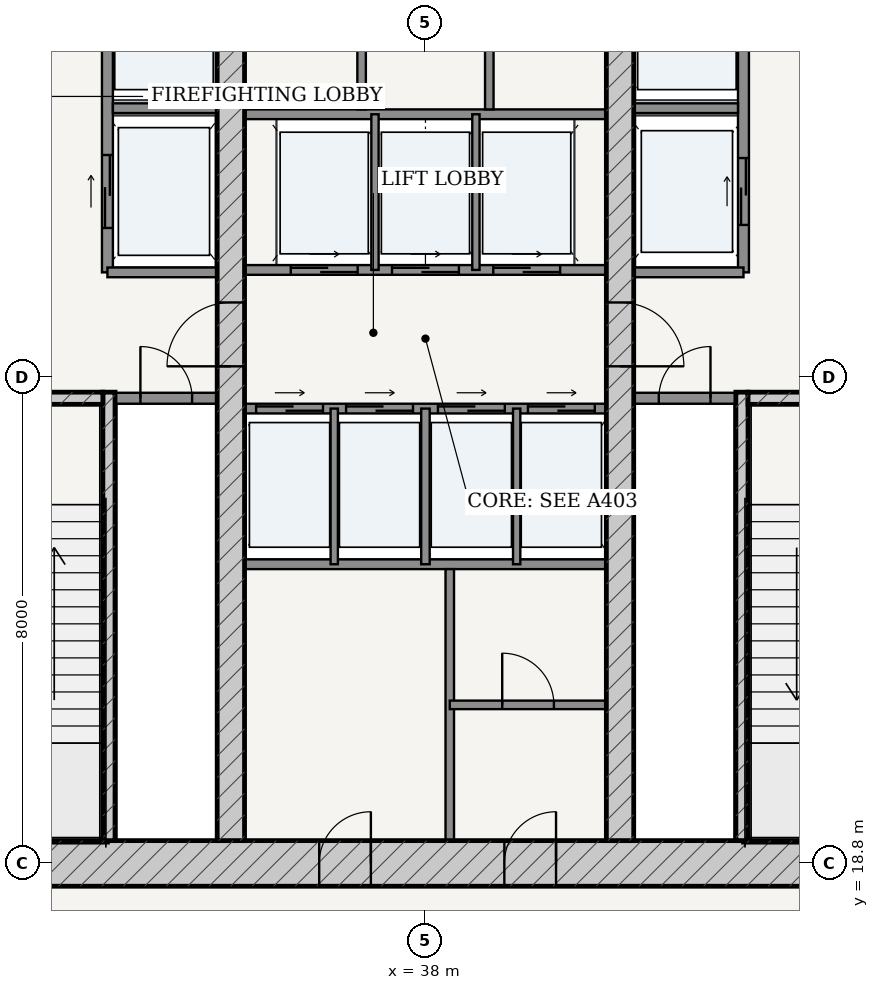
"""IFC4 building model, lengths in metres.
Left out: names, types, materials, properties, quantities, classifications, styles, units other than length and angle.
Written with IfcOpenShell. Run it as: python <this file> out.ifc"""

import sys

from ifc_helpers import new_model, si_unit, direction, frame, frame_2d, origin, place, context, subcontext, project, spatial, rectangle, extrude, source, transform, mapped, element, fill, save


model = new_model("IFC4")
c1 = context("Model", 3, precision=1e-05, world=origin(), true_north=direction((-0.2419218956, 0.970295726276)))
c2 = subcontext(c1, "Body", "Model", "MODEL_VIEW")
j1 = project(units=[si_unit("LENGTHUNIT", "METRE"), si_unit("PLANEANGLEUNIT", "RADIAN")], contexts=[c1])
p1 = place(None, origin())
s1 = spatial("IfcSite", under=j1, at=p1, CompositionType="ELEMENT")
p2 = place(p1, origin())
s2 = spatial("IfcBuilding", under=s1, at=p2, CompositionType="ELEMENT")
p3 = place(p2, origin())
s3 = spatial("IfcBuildingStorey", under=s2, at=p3, CompositionType="ELEMENT", Elevation=0.0)
p4 = place(p3, frame((28.625, 18.8, 0.0), z_axis=(0.0, 0.0, 1.0), x_axis=(1.0, 0.0, 0.0)))
e1 = element("IfcWall", 1, at=p4, inside=s3, PredefinedType="SHEAR", context=c2, shape_type="SweptSolid", body=[
    extrude(rectangle(XDim=18.75, YDim=0.75, at=frame_2d((9.375, 0.0))), origin(), (0.0, 0.0, 1.0), 5.1),
])
p5 = place(p4, frame((7.627, 0.0, 0.0)))
e2 = element("IfcOpeningElement", 2, at=p5, cuts=e1, PredefinedType="OPENING", context=c2, shape_type="SweptSolid", body=[
    extrude(rectangle(XDim=0.85, YDim=2.1, at=frame_2d((0.425, 1.05))), frame((0.0, 0.385, 0.0), z_axis=(0.0, -1.0, 0.0), x_axis=(1.0, 0.0, 0.0)), (0.0, 0.0, 1.0), 0.77),
])
p6 = place(p4, frame((10.673, 0.0, 0.0)))
e3 = element("IfcOpeningElement", 3, at=p6, cuts=e1, PredefinedType="OPENING", context=c2, shape_type="SweptSolid", body=[
    extrude(rectangle(XDim=0.85, YDim=2.1, at=frame_2d((0.425, 1.05))), frame((0.0, 0.385, 0.0), z_axis=(0.0, -1.0, 0.0), x_axis=(1.0, 0.0, 0.0)), (0.0, 0.0, 1.0), 0.77),
])
p7 = place(p3, frame((32.795, 19.175, 0.0), z_axis=(0.0, 0.0, 1.0), x_axis=(0.0, 1.0, 0.0)))
e4 = element("IfcWall", 4, at=p7, inside=s3, PredefinedType="SOLIDWALL", context=c2, shape_type="SweptSolid", body=[
    extrude(rectangle(XDim=7.375, YDim=0.2, at=frame_2d((3.688, 0.0))), origin(), (0.0, 0.0, 1.0), 5.1),
])
p8 = place(p3, frame((29.375, 26.45, 0.0), z_axis=(0.0, 0.0, 1.0), x_axis=(1.0, 0.0, 0.0)))
e5 = element("IfcWall", 5, at=p8, inside=s3, PredefinedType="SOLIDWALL", context=c2, shape_type="SweptSolid", body=[
    extrude(rectangle(XDim=3.32, YDim=0.2, at=frame_2d((1.66, 0.0))), origin(), (0.0, 0.0, 1.0), 5.1),
])
p9 = place(p8, frame((1.185, 0.0, 0.0)))
e6 = element("IfcOpeningElement", 6, at=p9, cuts=e5, PredefinedType="OPENING", context=c2, shape_type="SweptSolid", body=[
    extrude(rectangle(XDim=0.95, YDim=2.15, at=frame_2d((0.475, 1.075))), frame((0.0, 0.11, 0.0), z_axis=(0.0, -1.0, 0.0), x_axis=(1.0, 0.0, 0.0)), (0.0, 0.0, 1.0), 0.22),
])
p10 = place(p3, frame((43.205, 19.175, 0.0), z_axis=(0.0, 0.0, 1.0), x_axis=(0.0, 1.0, 0.0)))
e7 = element("IfcWall", 7, at=p10, inside=s3, PredefinedType="SOLIDWALL", context=c2, shape_type="SweptSolid", body=[
    extrude(rectangle(XDim=7.375, YDim=0.2, at=frame_2d((3.688, 0.0))), origin(), (0.0, 0.0, 1.0), 5.1),
])
p11 = place(p3, frame((43.305, 26.45, 0.0), z_axis=(0.0, 0.0, 1.0), x_axis=(1.0, 0.0, 0.0)))
e8 = element("IfcWall", 8, at=p11, inside=s3, PredefinedType="SOLIDWALL", context=c2, shape_type="SweptSolid", body=[
    extrude(rectangle(XDim=3.32, YDim=0.2, at=frame_2d((1.66, 0.0))), origin(), (0.0, 0.0, 1.0), 5.1),
])
p12 = place(p11, frame((1.185, 0.0, 0.0)))
e9 = element("IfcOpeningElement", 9, at=p12, cuts=e8, PredefinedType="OPENING", context=c2, shape_type="SweptSolid", body=[
    extrude(rectangle(XDim=0.95, YDim=2.15, at=frame_2d((0.475, 1.075))), frame((0.0, 0.11, 0.0), z_axis=(0.0, -1.0, 0.0), x_axis=(1.0, 0.0, 0.0)), (0.0, 0.0, 1.0), 0.22),
])
p13 = place(p3, frame((34.8, 19.175, 0.0), z_axis=(0.0, 0.0, 1.0), x_axis=(0.0, 1.0, 0.0)))
e10 = element("IfcWall", 10, at=p13, inside=s3, PredefinedType="SHEAR", context=c2, shape_type="SweptSolid", body=[
    extrude(rectangle(XDim=15.25, YDim=0.45, at=frame_2d((7.625, 0.0))), origin(), (0.0, 0.0, 1.0), 5.1),
])
p14 = place(p13, frame((7.8, 0.0, 0.0)))
e11 = element("IfcOpeningElement", 11, at=p14, cuts=e10, PredefinedType="OPENING", context=c2, shape_type="SweptSolid", body=[
    extrude(rectangle(XDim=1.05, YDim=2.15, at=frame_2d((0.525, 1.075))), frame((0.0, 0.235, 0.0), z_axis=(0.0, -1.0, 0.0), x_axis=(1.0, 0.0, 0.0)), (0.0, 0.0, 1.0), 0.47),
])
p15 = place(p3, frame((41.2, 19.175, 0.0), z_axis=(0.0, 0.0, 1.0), x_axis=(0.0, 1.0, 0.0)))
e12 = element("IfcWall", 12, at=p15, inside=s3, PredefinedType="SHEAR", context=c2, shape_type="SweptSolid", body=[
    extrude(rectangle(XDim=15.25, YDim=0.45, at=frame_2d((7.625, 0.0))), origin(), (0.0, 0.0, 1.0), 5.1),
])
p16 = place(p15, frame((7.8, 0.0, 0.0)))
e13 = element("IfcOpeningElement", 13, at=p16, cuts=e12, PredefinedType="OPENING", context=c2, shape_type="SweptSolid", body=[
    extrude(rectangle(XDim=1.05, YDim=2.15, at=frame_2d((0.525, 1.075))), frame((0.0, 0.235, 0.0), z_axis=(0.0, -1.0, 0.0), x_axis=(1.0, 0.0, 0.0)), (0.0, 0.0, 1.0), 0.47),
])
p17 = place(p3, frame((32.9, 26.45, 0.0), z_axis=(0.0, 0.0, 1.0), x_axis=(1.0, 0.0, 0.0)))
e14 = element("IfcWall", 14, at=p17, inside=s3, PredefinedType="PARTITIONING", context=c2, shape_type="SweptSolid", body=[
    extrude(rectangle(XDim=1.675, YDim=0.18, at=frame_2d((0.837, 0.0))), origin(), (0.0, 0.0, 1.0), 5.1),
])
p18 = place(p17, frame((0.413, 0.0, 0.0)))
e15 = element("IfcOpeningElement", 15, at=p18, cuts=e14, PredefinedType="OPENING", context=c2, shape_type="SweptSolid", body=[
    extrude(rectangle(XDim=0.85, YDim=2.1, at=frame_2d((0.425, 1.05))), frame((0.0, 0.1, 0.0), z_axis=(0.0, -1.0, 0.0), x_axis=(1.0, 0.0, 0.0)), (0.0, 0.0, 1.0), 0.2),
])
p19 = place(p3, frame((41.425, 26.45, 0.0), z_axis=(0.0, 0.0, 1.0), x_axis=(1.0, 0.0, 0.0)))
e16 = element("IfcWall", 16, at=p19, inside=s3, PredefinedType="PARTITIONING", context=c2, shape_type="SweptSolid", body=[
    extrude(rectangle(XDim=1.675, YDim=0.18, at=frame_2d((0.837, 0.0))), origin(), (0.0, 0.0, 1.0), 5.1),
])
p20 = place(p19, frame((0.413, 0.0, 0.0)))
e17 = element("IfcOpeningElement", 17, at=p20, cuts=e16, PredefinedType="OPENING", context=c2, shape_type="SweptSolid", body=[
    extrude(rectangle(XDim=0.85, YDim=2.1, at=frame_2d((0.425, 1.05))), frame((0.0, 0.1, 0.0), z_axis=(0.0, -1.0, 0.0), x_axis=(1.0, 0.0, 0.0)), (0.0, 0.0, 1.0), 0.2),
])
p21 = place(p3, frame((32.77, 28.52, 0.0), z_axis=(0.0, 0.0, 1.0), x_axis=(0.0, 1.0, 0.0)))
e18 = element("IfcWall", 18, at=p21, inside=s3, PredefinedType="PARTITIONING", context=c2, shape_type="SweptSolid", body=[
    extrude(rectangle(XDim=5.905, YDim=0.18, at=frame_2d((2.953, 0.0))), origin(), (0.0, 0.0, 1.0), 5.1),
])
p22 = place(p21, frame((3.655, 0.0, 0.0)))
e19 = element("IfcOpeningElement", 19, at=p22, cuts=e18, PredefinedType="OPENING", context=c2, shape_type="SweptSolid", body=[
    extrude(rectangle(XDim=1.15, YDim=2.2, at=frame_2d((0.575, 1.1))), frame((0.0, 0.1, 0.0), z_axis=(0.0, -1.0, 0.0), x_axis=(1.0, 0.0, 0.0)), (0.0, 0.0, 1.0), 0.2),
])
p23 = place(p21, frame((0.73, 0.0, 0.0)))
e20 = element("IfcOpeningElement", 20, at=p23, cuts=e18, PredefinedType="OPENING", context=c2, shape_type="SweptSolid", body=[
    extrude(rectangle(XDim=1.2, YDim=2.25, at=frame_2d((0.6, 1.125))), frame((0.0, 0.1, 0.0), z_axis=(0.0, -1.0, 0.0), x_axis=(1.0, 0.0, 0.0)), (0.0, 0.0, 1.0), 0.2),
])
p24 = place(p3, frame((32.86, 31.22, 0.0), z_axis=(0.0, 0.0, 1.0), x_axis=(1.0, 0.0, 0.0)))
e21 = element("IfcWall", 21, at=p24, inside=s3, PredefinedType="PARTITIONING", context=c2, shape_type="SweptSolid", body=[
    extrude(rectangle(XDim=1.715, YDim=0.16, at=frame_2d((0.857, 0.0))), origin(), (0.0, 0.0, 1.0), 5.1),
])
p25 = place(p3, frame((32.77, 28.52, 0.0), z_axis=(0.0, 0.0, 1.0), x_axis=(1.0, 0.0, 0.0)))
e22 = element("IfcWall", 22, at=p25, inside=s3, PredefinedType="PARTITIONING", context=c2, shape_type="SweptSolid", body=[
    extrude(rectangle(XDim=1.805, YDim=0.16, at=frame_2d((0.902, 0.0))), origin(), (0.0, 0.0, 1.0), 5.1),
])
p26 = place(p3, frame((43.23, 28.52, 0.0), z_axis=(0.0, 0.0, 1.0), x_axis=(0.0, 1.0, 0.0)))
e23 = element("IfcWall", 23, at=p26, inside=s3, PredefinedType="PARTITIONING", context=c2, shape_type="SweptSolid", body=[
    extrude(rectangle(XDim=5.905, YDim=0.18, at=frame_2d((2.953, 0.0))), origin(), (0.0, 0.0, 1.0), 5.1),
])
p27 = place(p26, frame((3.655, 0.0, 0.0)))
e24 = element("IfcOpeningElement", 24, at=p27, cuts=e23, PredefinedType="OPENING", context=c2, shape_type="SweptSolid", body=[
    extrude(rectangle(XDim=1.15, YDim=2.2, at=frame_2d((0.575, 1.1))), frame((0.0, 0.1, 0.0), z_axis=(0.0, -1.0, 0.0), x_axis=(1.0, 0.0, 0.0)), (0.0, 0.0, 1.0), 0.2),
])
p28 = place(p26, frame((0.78, 0.0, 0.0)))
e25 = element("IfcOpeningElement", 25, at=p28, cuts=e23, PredefinedType="OPENING", context=c2, shape_type="SweptSolid", body=[
    extrude(rectangle(XDim=1.1, YDim=2.2, at=frame_2d((0.55, 1.1))), frame((0.0, 0.1, 0.0), z_axis=(0.0, -1.0, 0.0), x_axis=(1.0, 0.0, 0.0)), (0.0, 0.0, 1.0), 0.2),
])
p29 = place(p3, frame((41.425, 31.22, 0.0), z_axis=(0.0, 0.0, 1.0), x_axis=(1.0, 0.0, 0.0)))
e26 = element("IfcWall", 26, at=p29, inside=s3, PredefinedType="PARTITIONING", context=c2, shape_type="SweptSolid", body=[
    extrude(rectangle(XDim=1.715, YDim=0.16, at=frame_2d((0.857, 0.0))), origin(), (0.0, 0.0, 1.0), 5.1),
])
p30 = place(p3, frame((41.425, 28.52, 0.0), z_axis=(0.0, 0.0, 1.0), x_axis=(1.0, 0.0, 0.0)))
e27 = element("IfcWall", 27, at=p30, inside=s3, PredefinedType="PARTITIONING", context=c2, shape_type="SweptSolid", body=[
    extrude(rectangle(XDim=1.805, YDim=0.16, at=frame_2d((0.902, 0.0))), origin(), (0.0, 0.0, 1.0), 5.1),
])
p31 = place(p3, frame((35.025, 28.56, 0.0), z_axis=(0.0, 0.0, 1.0), x_axis=(1.0, 0.0, 0.0)))
e28 = element("IfcWall", 28, at=p31, inside=s3, PredefinedType="PARTITIONING", context=c2, shape_type="SweptSolid", body=[
    extrude(rectangle(XDim=5.95, YDim=0.16, at=frame_2d((2.975, 0.0))), origin(), (0.0, 0.0, 1.0), 5.1),
])
p32 = place(p31, frame((0.76, 0.0, 0.0)))
e29 = element("IfcOpeningElement", 29, at=p32, cuts=e28, PredefinedType="OPENING", context=c2, shape_type="SweptSolid", body=[
    extrude(rectangle(XDim=1.1, YDim=2.2, at=frame_2d((0.55, 1.1))), frame((0.0, 0.09, 0.0), z_axis=(0.0, -1.0, 0.0), x_axis=(1.0, 0.0, 0.0)), (0.0, 0.0, 1.0), 0.18),
])
p33 = place(p31, frame((2.425, 0.0, 0.0)))
e30 = element("IfcOpeningElement", 30, at=p33, cuts=e28, PredefinedType="OPENING", context=c2, shape_type="SweptSolid", body=[
    extrude(rectangle(XDim=1.1, YDim=2.2, at=frame_2d((0.55, 1.1))), frame((0.0, 0.09, 0.0), z_axis=(0.0, -1.0, 0.0), x_axis=(1.0, 0.0, 0.0)), (0.0, 0.0, 1.0), 0.18),
])
p34 = place(p31, frame((4.09, 0.0, 0.0)))
e31 = element("IfcOpeningElement", 31, at=p34, cuts=e28, PredefinedType="OPENING", context=c2, shape_type="SweptSolid", body=[
    extrude(rectangle(XDim=1.1, YDim=2.2, at=frame_2d((0.55, 1.1))), frame((0.0, 0.09, 0.0), z_axis=(0.0, -1.0, 0.0), x_axis=(1.0, 0.0, 0.0)), (0.0, 0.0, 1.0), 0.18),
])
p35 = place(p3, frame((35.025, 31.12, 0.0), z_axis=(0.0, 0.0, 1.0), x_axis=(1.0, 0.0, 0.0)))
e32 = element("IfcWall", 32, at=p35, inside=s3, PredefinedType="PARTITIONING", context=c2, shape_type="SweptSolid", body=[
    extrude(rectangle(XDim=5.95, YDim=0.16, at=frame_2d((2.975, 0.0))), origin(), (0.0, 0.0, 1.0), 5.1),
])
for number, where, z_axis, x_axis in (
    (33, (37.17, 28.56, 0.0), (0.0, 0.0, 1.0), (0.0, 1.0, 0.0)),
    (34, (38.83, 28.56, 0.0), (0.0, 0.0, 1.0), (0.0, 1.0, 0.0)),
):
    element("IfcWall", number, at=place(p3, frame(where, z_axis=z_axis, x_axis=x_axis)), inside=s3, PredefinedType="PARTITIONING", context=c2, shape_type="SweptSolid", body=[
        extrude(rectangle(XDim=2.56, YDim=0.12, at=frame_2d((1.28, 0.0))), origin(), (0.0, 0.0, 1.0), 5.1),
    ])
for number, where, z_axis, x_axis in (
    (35, (36.95, 31.2, 0.0), (0.0, 0.0, 1.0), (0.0, 1.0, 0.0)),
    (36, (39.05, 31.2, 0.0), (0.0, 0.0, 1.0), (0.0, 1.0, 0.0)),
):
    element("IfcWall", number, at=place(p3, frame(where, z_axis=z_axis, x_axis=x_axis)), inside=s3, PredefinedType="PARTITIONING", context=c2, shape_type="SweptSolid", body=[
        extrude(rectangle(XDim=3.225, YDim=0.14, at=frame_2d((1.613, 0.0))), origin(), (0.0, 0.0, 1.0), 5.1),
    ])
p36 = place(p3, frame((35.025, 26.28, 0.0), z_axis=(0.0, 0.0, 1.0), x_axis=(1.0, 0.0, 0.0)))
e37 = element("IfcWall", 37, at=p36, inside=s3, PredefinedType="PARTITIONING", context=c2, shape_type="SweptSolid", body=[
    extrude(rectangle(XDim=5.95, YDim=0.16, at=frame_2d((2.975, 0.0))), origin(), (0.0, 0.0, 1.0), 5.1),
])
p37 = place(p36, frame((0.19, 0.0, 0.0)))
e38 = element("IfcOpeningElement", 38, at=p37, cuts=e37, PredefinedType="OPENING", context=c2, shape_type="SweptSolid", body=[
    extrude(rectangle(XDim=1.1, YDim=2.2, at=frame_2d((0.55, 1.1))), frame((0.0, 0.09, 0.0), z_axis=(0.0, -1.0, 0.0), x_axis=(1.0, 0.0, 0.0)), (0.0, 0.0, 1.0), 0.18),
])
p38 = place(p36, frame((1.67, 0.0, 0.0)))
e39 = element("IfcOpeningElement", 39, at=p38, cuts=e37, PredefinedType="OPENING", context=c2, shape_type="SweptSolid", body=[
    extrude(rectangle(XDim=1.1, YDim=2.2, at=frame_2d((0.55, 1.1))), frame((0.0, 0.09, 0.0), z_axis=(0.0, -1.0, 0.0), x_axis=(1.0, 0.0, 0.0)), (0.0, 0.0, 1.0), 0.18),
])
p39 = place(p36, frame((3.18, 0.0, 0.0)))
e40 = element("IfcOpeningElement", 40, at=p39, cuts=e37, PredefinedType="OPENING", context=c2, shape_type="SweptSolid", body=[
    extrude(rectangle(XDim=1.1, YDim=2.2, at=frame_2d((0.55, 1.1))), frame((0.0, 0.09, 0.0), z_axis=(0.0, -1.0, 0.0), x_axis=(1.0, 0.0, 0.0)), (0.0, 0.0, 1.0), 0.18),
])
p40 = place(p36, frame((4.66, 0.0, 0.0)))
e41 = element("IfcOpeningElement", 41, at=p40, cuts=e37, PredefinedType="OPENING", context=c2, shape_type="SweptSolid", body=[
    extrude(rectangle(XDim=1.1, YDim=2.2, at=frame_2d((0.55, 1.1))), frame((0.0, 0.09, 0.0), z_axis=(0.0, -1.0, 0.0), x_axis=(1.0, 0.0, 0.0)), (0.0, 0.0, 1.0), 0.18),
])
p41 = place(p3, frame((35.025, 23.72, 0.0), z_axis=(0.0, 0.0, 1.0), x_axis=(1.0, 0.0, 0.0)))
e42 = element("IfcWall", 42, at=p41, inside=s3, PredefinedType="PARTITIONING", context=c2, shape_type="SweptSolid", body=[
    extrude(rectangle(XDim=5.95, YDim=0.16, at=frame_2d((2.975, 0.0))), origin(), (0.0, 0.0, 1.0), 5.1),
])
p42 = place(p3, frame((36.5, 23.72, 0.0), z_axis=(0.0, 0.0, 1.0), x_axis=(0.0, 1.0, 0.0)))
e43 = element("IfcWall", 43, at=p42, inside=s3, PredefinedType="PARTITIONING", context=c2, shape_type="SweptSolid", body=[
    extrude(rectangle(XDim=2.56, YDim=0.12, at=frame_2d((1.28, 0.0))), origin(), (0.0, 0.0, 1.0), 5.1),
])
p43 = place(p3, frame((38.0, 23.72, 0.0), z_axis=(0.0, 0.0, 1.0), x_axis=(0.0, 1.0, 0.0)))
e44 = element("IfcWall", 44, at=p43, inside=s3, PredefinedType="PARTITIONING", context=c2, shape_type="SweptSolid", body=[
    extrude(rectangle(XDim=2.56, YDim=0.14, at=frame_2d((1.28, 0.0))), origin(), (0.0, 0.0, 1.0), 5.1),
])
p44 = place(p3, frame((39.5, 23.72, 0.0), z_axis=(0.0, 0.0, 1.0), x_axis=(0.0, 1.0, 0.0)))
e45 = element("IfcWall", 45, at=p44, inside=s3, PredefinedType="PARTITIONING", context=c2, shape_type="SweptSolid", body=[
    extrude(rectangle(XDim=2.56, YDim=0.12, at=frame_2d((1.28, 0.0))), origin(), (0.0, 0.0, 1.0), 5.1),
])
p45 = place(p3, frame((38.4, 19.175, 0.0), z_axis=(0.0, 0.0, 1.0), x_axis=(0.0, 1.0, 0.0)))
e46 = element("IfcWall", 46, at=p45, inside=s3, PredefinedType="PARTITIONING", context=c2, shape_type="SweptSolid", body=[
    extrude(rectangle(XDim=4.465, YDim=0.14, at=frame_2d((2.232, 0.0))), origin(), (0.0, 0.0, 1.0), 5.1),
])
p46 = place(p3, frame((38.4, 21.407, 0.0), z_axis=(0.0, 0.0, 1.0), x_axis=(1.0, 0.0, 0.0)))
e47 = element("IfcWall", 47, at=p46, inside=s3, PredefinedType="PARTITIONING", context=c2, shape_type="SweptSolid", body=[
    extrude(rectangle(XDim=2.575, YDim=0.14, at=frame_2d((1.288, 0.0))), origin(), (0.0, 0.0, 1.0), 5.1),
])
p47 = place(p46, frame((0.863, 0.0, 0.0)))
e48 = element("IfcOpeningElement", 48, at=p47, cuts=e47, PredefinedType="OPENING", context=c2, shape_type="SweptSolid", body=[
    extrude(rectangle(XDim=0.85, YDim=2.1, at=frame_2d((0.425, 1.05))), frame((0.0, 0.08, 0.0), z_axis=(0.0, -1.0, 0.0), x_axis=(1.0, 0.0, 0.0)), (0.0, 0.0, 1.0), 0.16),
])
m1 = source(origin(), c2, "Body", "SweptSolid", [
    extrude(rectangle(XDim=1.05, YDim=2.15, at=frame_2d((0.525, 1.075))), frame((0.0, 0.025, 0.0), z_axis=(0.0, -1.0, 0.0), x_axis=(1.0, 0.0, 0.0)), (0.0, 0.0, 1.0), 0.05),
])
p48 = place(p14, origin())
e49 = element("IfcDoor", 49, at=p48, inside=s3, OperationType="SINGLE_SWING_LEFT", PredefinedType="DOOR", context=c2, shape_type="MappedRepresentation", body=[
    mapped(m1, transform((0.0, 0.0, 0.0), scale=1.0)),
])
fill(e11, e49)
p49 = place(p16, frame((1.05, 0.0, 0.0), z_axis=(0.0, 0.0, 1.0), x_axis=(-1.0, 0.0, 0.0)))
e50 = element("IfcDoor", 50, at=p49, inside=s3, OperationType="SINGLE_SWING_RIGHT", PredefinedType="DOOR", context=c2, shape_type="MappedRepresentation", body=[
    mapped(m1, transform((0.0, 0.0, 0.0), scale=1.0)),
])
fill(e13, e50)
m2 = source(origin(), c2, "Body", "SweptSolid", [
    extrude(rectangle(XDim=0.85, YDim=2.1, at=frame_2d((0.425, 1.05))), frame((0.0, 0.025, 0.0), z_axis=(0.0, -1.0, 0.0), x_axis=(1.0, 0.0, 0.0)), (0.0, 0.0, 1.0), 0.05),
])
p50 = place(p18, origin())
e51 = element("IfcDoor", 51, at=p50, inside=s3, OperationType="SINGLE_SWING_LEFT", PredefinedType="DOOR", context=c2, shape_type="MappedRepresentation", body=[
    mapped(m2, transform((0.0, 0.0, 0.0), scale=1.0)),
])
fill(e15, e51)
p51 = place(p20, origin())
e52 = element("IfcDoor", 52, at=p51, inside=s3, OperationType="SINGLE_SWING_RIGHT", PredefinedType="DOOR", context=c2, shape_type="MappedRepresentation", body=[
    mapped(m2, transform((0.0, 0.0, 0.0), scale=1.0)),
])
fill(e17, e52)
p52 = place(p5, origin())
e53 = element("IfcDoor", 53, at=p52, inside=s3, OperationType="SINGLE_SWING_RIGHT", PredefinedType="DOOR", context=c2, shape_type="MappedRepresentation", body=[
    mapped(m2, transform((0.0, 0.0, 0.0), scale=1.0)),
])
fill(e2, e53)
p53 = place(p6, origin())
e54 = element("IfcDoor", 54, at=p53, inside=s3, OperationType="SINGLE_SWING_RIGHT", PredefinedType="DOOR", context=c2, shape_type="MappedRepresentation", body=[
    mapped(m2, transform((0.0, 0.0, 0.0), scale=1.0)),
])
fill(e3, e54)
p54 = place(p47, origin())
e55 = element("IfcDoor", 55, at=p54, inside=s3, OperationType="SINGLE_SWING_LEFT", PredefinedType="DOOR", context=c2, shape_type="MappedRepresentation", body=[
    mapped(m2, transform((0.0, 0.0, 0.0), scale=1.0)),
])
fill(e48, e55)
m3 = source(origin(), c2, "Body", "SweptSolid", [
    extrude(rectangle(XDim=1.2, YDim=2.25, at=frame_2d((0.6, 1.125))), frame((0.0, 0.025, 0.0), z_axis=(0.0, -1.0, 0.0), x_axis=(1.0, 0.0, 0.0)), (0.0, 0.0, 1.0), 0.05),
])
p55 = place(p23, origin())
e56 = element("IfcDoor", 56, at=p55, inside=s3, OperationType="DOUBLE_DOOR_SLIDING", PredefinedType="DOOR", context=c2, shape_type="MappedRepresentation", body=[
    mapped(m3, transform((0.0, 0.0, 0.0), scale=1.0)),
])
fill(e20, e56)
m4 = source(origin(), c2, "Body", "SweptSolid", [
    extrude(rectangle(XDim=1.1, YDim=2.2, at=frame_2d((0.55, 1.1))), frame((0.0, 0.025, 0.0), z_axis=(0.0, -1.0, 0.0), x_axis=(1.0, 0.0, 0.0)), (0.0, 0.0, 1.0), 0.05),
])
p56 = place(p28, origin())
e57 = element("IfcDoor", 57, at=p56, inside=s3, OperationType="DOUBLE_DOOR_SLIDING", PredefinedType="DOOR", context=c2, shape_type="MappedRepresentation", body=[
    mapped(m4, transform((0.0, 0.0, 0.0), scale=1.0)),
])
fill(e25, e57)
p57 = place(p32, origin())
e58 = element("IfcDoor", 58, at=p57, inside=s3, OperationType="DOUBLE_DOOR_SLIDING", PredefinedType="DOOR", context=c2, shape_type="MappedRepresentation", body=[
    mapped(m4, transform((0.0, 0.0, 0.0), scale=1.0)),
])
fill(e29, e58)
p58 = place(p33, origin())
e59 = element("IfcDoor", 59, at=p58, inside=s3, OperationType="DOUBLE_DOOR_SLIDING", PredefinedType="DOOR", context=c2, shape_type="MappedRepresentation", body=[
    mapped(m4, transform((0.0, 0.0, 0.0), scale=1.0)),
])
fill(e30, e59)
p59 = place(p34, origin())
e60 = element("IfcDoor", 60, at=p59, inside=s3, OperationType="DOUBLE_DOOR_SLIDING", PredefinedType="DOOR", context=c2, shape_type="MappedRepresentation", body=[
    mapped(m4, transform((0.0, 0.0, 0.0), scale=1.0)),
])
fill(e31, e60)
p60 = place(p37, origin())
e61 = element("IfcDoor", 61, at=p60, inside=s3, OperationType="DOUBLE_DOOR_SLIDING", PredefinedType="DOOR", context=c2, shape_type="MappedRepresentation", body=[
    mapped(m4, transform((0.0, 0.0, 0.0), scale=1.0)),
])
fill(e38, e61)
p61 = place(p38, origin())
e62 = element("IfcDoor", 62, at=p61, inside=s3, OperationType="DOUBLE_DOOR_SLIDING", PredefinedType="DOOR", context=c2, shape_type="MappedRepresentation", body=[
    mapped(m4, transform((0.0, 0.0, 0.0), scale=1.0)),
])
fill(e39, e62)
p62 = place(p39, origin())
e63 = element("IfcDoor", 63, at=p62, inside=s3, OperationType="DOUBLE_DOOR_SLIDING", PredefinedType="DOOR", context=c2, shape_type="MappedRepresentation", body=[
    mapped(m4, transform((0.0, 0.0, 0.0), scale=1.0)),
])
fill(e40, e63)
p63 = place(p40, origin())
e64 = element("IfcDoor", 64, at=p63, inside=s3, OperationType="DOUBLE_DOOR_SLIDING", PredefinedType="DOOR", context=c2, shape_type="MappedRepresentation", body=[
    mapped(m4, transform((0.0, 0.0, 0.0), scale=1.0)),
])
fill(e41, e64)
save(model, sys.argv[1])
